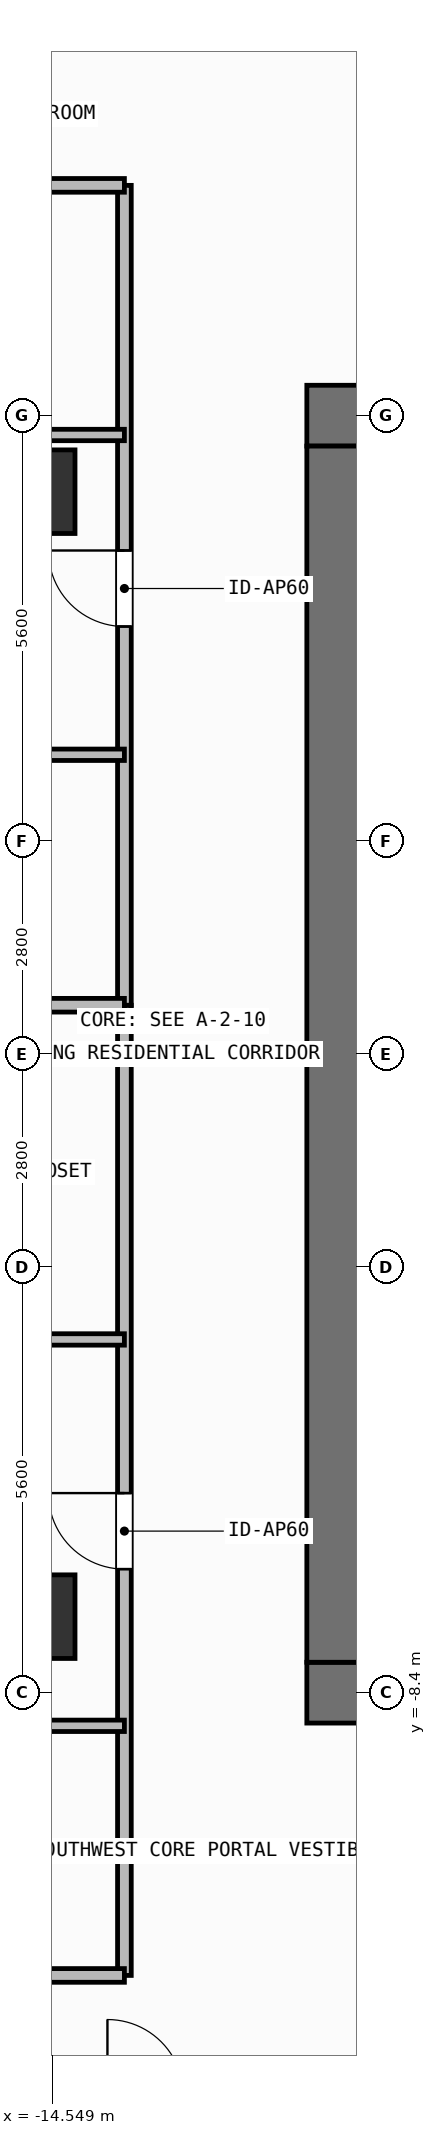
"""IFC4 building model, lengths in metres.
Left out: names, types, materials, properties, quantities, classifications, styles, units other than length and angle.
Written with IfcOpenShell. Run it as: python <this file> out.ifc"""

import sys

from ifc_helpers import new_model, si_unit, direction, frame, frame_2d, origin, origin_2d, place, context, subcontext, project, spatial, rectangle, extrude, element, fill, save


model = new_model("IFC4")
c1 = context("Model", 3, precision=1e-05, world=origin(), true_north=direction((0.0, 1.0)))
c2 = subcontext(c1, "Body", "Model", "MODEL_VIEW")
j1 = project(units=[si_unit("LENGTHUNIT", "METRE"), si_unit("PLANEANGLEUNIT", "RADIAN")], contexts=[c1])
p1 = place(None, origin())
s1 = spatial("IfcSite", under=j1, at=p1, CompositionType="ELEMENT")
p2 = place(p1, origin())
s2 = spatial("IfcBuilding", under=s1, at=p2, CompositionType="ELEMENT")
p3 = place(p2, frame((0.0, 0.0, 191.4)))
s3 = spatial("IfcBuildingStorey", under=s2, at=p3, CompositionType="ELEMENT", Elevation=191.4)
for number, where, z_axis, x_axis in (
    (1, (-11.2, -8.4, 0.0), (0.0, 0.0, 1.0), (1.0, 0.0, 0.0)),
    (2, (-11.2, 8.4, 0.0), (0.0, 0.0, 1.0), (1.0, 0.0, 0.0)),
):
    element("IfcWall", number, at=place(p3, frame(where, z_axis=z_axis, x_axis=x_axis)), inside=s3, PredefinedType="SHEAR", context=c2, shape_type="SweptSolid", body=[
        extrude(rectangle(XDim=1.5, YDim=0.8, at=frame_2d((0.75, 0.0))), origin(), (0.0, 0.0, 1.0), 3.9),
    ])
p4 = place(p3, frame((-10.8, -8.0, 0.0), z_axis=(0.0, 0.0, 1.0), x_axis=(0.0, 1.0, 0.0)))
e3 = element("IfcWall", 3, at=p4, inside=s3, PredefinedType="SHEAR", context=c2, shape_type="SweptSolid", body=[
    extrude(rectangle(XDim=16.0, YDim=0.8, at=frame_2d((8.0, 0.0))), origin(), (0.0, 0.0, 1.0), 3.9),
])
for number, where, z_axis, x_axis in (
    (4, (-14.8, -7.4, 0.0), (0.0, 0.0, 1.0), (1.0, 0.0, 0.0)),
    (5, (-14.8, 7.4, 0.0), (0.0, 0.0, 1.0), (1.0, 0.0, 0.0)),
):
    element("IfcColumn", number, at=place(p3, frame(where, z_axis=z_axis, x_axis=x_axis)), inside=s3, PredefinedType="COLUMN", context=c2, shape_type="SweptSolid", body=[
        extrude(rectangle(XDim=1.1, YDim=1.1, at=origin_2d()), origin(), (0.0, 0.0, 1.0), 3.9),
    ])
p5 = place(p3, frame((-13.6, -12.12, 0.0), z_axis=(0.0, 0.0, 1.0), x_axis=(0.0, 1.0, 0.0)))
e6 = element("IfcWall", 6, at=p5, inside=s3, PredefinedType="PARTITIONING", context=c2, shape_type="SweptSolid", body=[
    extrude(rectangle(XDim=12.764, YDim=0.18, at=frame_2d((6.382, 0.0))), origin(), (0.0, 0.0, 1.0), 3.68),
])
p6 = place(p5, frame((5.346, 0.0, 0.0)))
e7 = element("IfcOpeningElement", 7, at=p6, cuts=e6, PredefinedType="OPENING", context=c2, shape_type="SweptSolid", body=[
    extrude(rectangle(XDim=1.0, YDim=2.2, at=frame_2d((0.5, 1.1))), frame((0.0, 0.1, 0.0), z_axis=(0.0, -1.0, 0.0), x_axis=(1.0, 0.0, 0.0)), (0.0, 0.0, 1.0), 0.2),
])
p7 = place(p3, frame((-17.83, -3.753, 0.0), z_axis=(0.0, 0.0, 1.0), x_axis=(1.0, 0.0, 0.0)))
e8 = element("IfcWall", 8, at=p7, inside=s3, PredefinedType="PARTITIONING", context=c2, shape_type="SweptSolid", body=[
    extrude(rectangle(XDim=4.23, YDim=0.15, at=frame_2d((2.115, 0.0))), origin(), (0.0, 0.0, 1.0), 3.68),
])
p8 = place(p7, frame((1.6, 0.0, 0.0)))
e9 = element("IfcOpeningElement", 9, at=p8, cuts=e8, PredefinedType="OPENING", context=c2, shape_type="SweptSolid", body=[
    extrude(rectangle(XDim=0.85, YDim=2.1, at=frame_2d((0.425, 1.05))), frame((0.0, 0.085, 0.0), z_axis=(0.0, -1.0, 0.0), x_axis=(1.0, 0.0, 0.0)), (0.0, 0.0, 1.0), 0.17),
])
p9 = place(p3, frame((-20.769, -8.836, 0.0), z_axis=(0.0, 0.0, 1.0), x_axis=(1.0, 0.0, 0.0)))
e10 = element("IfcWall", 10, at=p9, inside=s3, PredefinedType="PARTITIONING", context=c2, shape_type="SweptSolid", body=[
    extrude(rectangle(XDim=7.169, YDim=0.15, at=frame_2d((3.584, 0.0))), origin(), (0.0, 0.0, 1.0), 3.68),
])
p10 = place(p9, frame((3.159, 0.0, 0.0)))
e11 = element("IfcOpeningElement", 11, at=p10, cuts=e10, PredefinedType="OPENING", context=c2, shape_type="SweptSolid", body=[
    extrude(rectangle(XDim=0.85, YDim=2.1, at=frame_2d((0.425, 1.05))), frame((0.0, 0.085, 0.0), z_axis=(0.0, -1.0, 0.0), x_axis=(1.0, 0.0, 0.0)), (0.0, 0.0, 1.0), 0.17),
])
p11 = place(p3, frame((-13.6, 0.644, 0.0), z_axis=(0.0, 0.0, 1.0), x_axis=(0.0, 1.0, 0.0)))
e12 = element("IfcWall", 12, at=p11, inside=s3, PredefinedType="PARTITIONING", context=c2, shape_type="SweptSolid", body=[
    extrude(rectangle(XDim=10.786, YDim=0.18, at=frame_2d((5.393, 0.0))), origin(), (0.0, 0.0, 1.0), 3.68),
])
p12 = place(p11, frame((4.982, 0.0, 0.0)))
e13 = element("IfcOpeningElement", 13, at=p12, cuts=e12, PredefinedType="OPENING", context=c2, shape_type="SweptSolid", body=[
    extrude(rectangle(XDim=1.0, YDim=2.2, at=frame_2d((0.5, 1.1))), frame((0.0, 0.1, 0.0), z_axis=(0.0, -1.0, 0.0), x_axis=(1.0, 0.0, 0.0)), (0.0, 0.0, 1.0), 0.2),
])
p13 = place(p3, frame((-20.769, 8.146, 0.0), z_axis=(0.0, 0.0, 1.0), x_axis=(1.0, 0.0, 0.0)))
e14 = element("IfcWall", 14, at=p13, inside=s3, PredefinedType="PARTITIONING", context=c2, shape_type="SweptSolid", body=[
    extrude(rectangle(XDim=7.169, YDim=0.15, at=frame_2d((3.584, 0.0))), origin(), (0.0, 0.0, 1.0), 3.68),
])
p14 = place(p13, frame((3.159, 0.0, 0.0)))
e15 = element("IfcOpeningElement", 15, at=p14, cuts=e14, PredefinedType="OPENING", context=c2, shape_type="SweptSolid", body=[
    extrude(rectangle(XDim=0.85, YDim=2.1, at=frame_2d((0.425, 1.05))), frame((0.0, 0.085, 0.0), z_axis=(0.0, -1.0, 0.0), x_axis=(1.0, 0.0, 0.0)), (0.0, 0.0, 1.0), 0.17),
])
p15 = place(p3, frame((-20.769, 3.939, 0.0), z_axis=(0.0, 0.0, 1.0), x_axis=(1.0, 0.0, 0.0)))
e16 = element("IfcWall", 16, at=p15, inside=s3, PredefinedType="PARTITIONING", context=c2, shape_type="SweptSolid", body=[
    extrude(rectangle(XDim=7.169, YDim=0.15, at=frame_2d((3.584, 0.0))), origin(), (0.0, 0.0, 1.0), 3.68),
])
p16 = place(p15, frame((3.159, 0.0, 0.0)))
e17 = element("IfcOpeningElement", 17, at=p16, cuts=e16, PredefinedType="OPENING", context=c2, shape_type="SweptSolid", body=[
    extrude(rectangle(XDim=0.85, YDim=2.1, at=frame_2d((0.425, 1.05))), frame((0.0, 0.085, 0.0), z_axis=(0.0, -1.0, 0.0), x_axis=(1.0, 0.0, 0.0)), (0.0, 0.0, 1.0), 0.17),
])
for number, where, z_axis, x_axis in (
    (18, (-24.13, 0.644, 0.0), (0.0, 0.0, 1.0), (1.0, 0.0, 0.0)),
    (19, (-24.13, -12.12, 0.0), (0.0, 0.0, 1.0), (1.0, 0.0, 0.0)),
):
    element("IfcWall", number, at=place(p3, frame(where, z_axis=z_axis, x_axis=x_axis)), inside=s3, PredefinedType="PARTITIONING", context=c2, shape_type="SweptSolid", body=[
        extrude(rectangle(XDim=10.53, YDim=0.18, at=frame_2d((5.265, 0.0))), origin(), (0.0, 0.0, 1.0), 3.68),
    ])
p17 = place(p3, frame((-24.13, 11.43, 0.0), z_axis=(0.0, 0.0, 1.0), x_axis=(1.0, 0.0, 0.0)))
e20 = element("IfcWall", 20, at=p17, inside=s3, PredefinedType="PARTITIONING", context=c2, shape_type="SweptSolid", body=[
    extrude(rectangle(XDim=10.53, YDim=0.18, at=frame_2d((5.265, 0.0))), origin(), (0.0, 0.0, 1.0), 3.42),
])
p18 = place(p6, origin())
e21 = element("IfcDoor", 21, at=p18, inside=s3, OperationType="SINGLE_SWING_RIGHT", PredefinedType="DOOR", context=c2, shape_type="SweptSolid", body=[
    extrude(rectangle(XDim=1.0, YDim=2.2, at=frame_2d((0.5, 1.1))), frame((0.0, 0.025, 0.0), z_axis=(0.0, -1.0, 0.0), x_axis=(1.0, 0.0, 0.0)), (0.0, 0.0, 1.0), 0.05),
])
fill(e7, e21)
p19 = place(p12, origin())
e22 = element("IfcDoor", 22, at=p19, inside=s3, OperationType="SINGLE_SWING_RIGHT", PredefinedType="DOOR", context=c2, shape_type="SweptSolid", body=[
    extrude(rectangle(XDim=1.0, YDim=2.2, at=frame_2d((0.5, 1.1))), frame((0.0, 0.025, 0.0), z_axis=(0.0, -1.0, 0.0), x_axis=(1.0, 0.0, 0.0)), (0.0, 0.0, 1.0), 0.05),
])
fill(e13, e22)
save(model, sys.argv[1])
